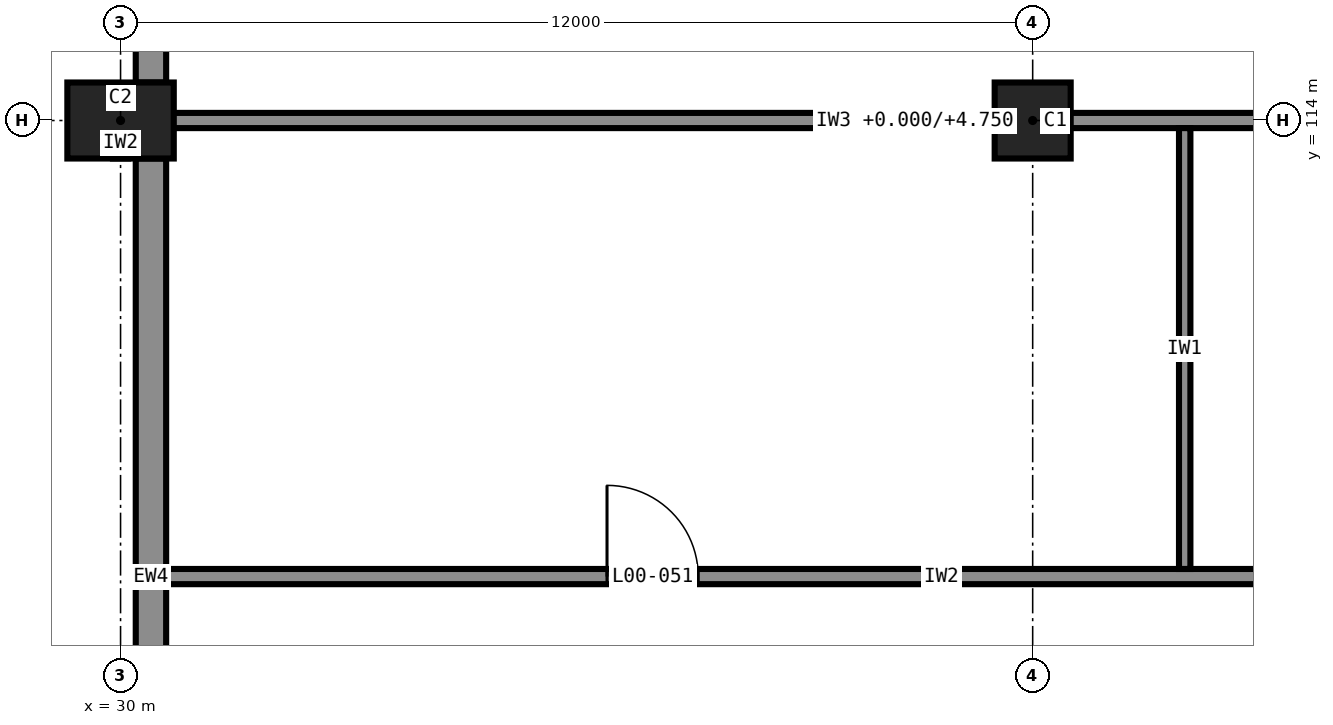
"""IFC4 building model, lengths in metres.
Left out: names, types, materials, properties, quantities, classifications, styles, units other than length and angle.
Written with IfcOpenShell. Run it as: python <this file> out.ifc"""

import sys

from ifc_helpers import new_model, si_unit, direction, frame, frame_2d, origin, origin_2d, place, context, subcontext, project, spatial, rectangle, extrude, element, fill, save


model = new_model("IFC4")
c1 = context("Model", 3, precision=1e-05, world=origin(), true_north=direction((0.0, 1.0)))
c2 = subcontext(c1, "Body", "Model", "MODEL_VIEW")
j1 = project(units=[si_unit("LENGTHUNIT", "METRE"), si_unit("PLANEANGLEUNIT", "RADIAN")], contexts=[c1])
p1 = place(None, origin())
s1 = spatial("IfcSite", under=j1, at=p1, CompositionType="ELEMENT")
p2 = place(p1, origin())
s2 = spatial("IfcBuilding", under=s1, at=p2, CompositionType="ELEMENT")
p3 = place(p2, origin())
s3 = spatial("IfcBuildingStorey", under=s2, at=p3, CompositionType="ELEMENT", Elevation=0.0)
p4 = place(p3, frame((30.0, 114.0, 0.0), z_axis=(0.0, 0.0, 1.0), x_axis=(1.0, 0.0, 0.0)))
e1 = element("IfcColumn", 1, at=p4, inside=s3, PredefinedType="COLUMN", context=c2, shape_type="SweptSolid", body=[
    extrude(rectangle(XDim=1.4, YDim=1.0, at=origin_2d()), origin(), (0.0, 0.0, 1.0), 6.0),
])
p5 = place(p3, frame((42.0, 114.0, 0.0), z_axis=(0.0, 0.0, 1.0), x_axis=(1.0, 0.0, 0.0)))
e2 = element("IfcColumn", 2, at=p5, inside=s3, PredefinedType="COLUMN", context=c2, shape_type="SweptSolid", body=[
    extrude(rectangle(XDim=1.0, YDim=1.0, at=origin_2d()), origin(), (0.0, 0.0, 1.0), 6.0),
])
p6 = place(p3, frame((30.4, 102.5, 0.0), z_axis=(0.0, 0.0, 1.0), x_axis=(0.0, 1.0, 0.0)))
e3 = element("IfcWall", 3, at=p6, inside=s3, PredefinedType="SOLIDWALL", context=c2, shape_type="SweptSolid", body=[
    extrude(rectangle(XDim=11.0, YDim=0.4, at=frame_2d((5.5, 0.0))), origin(), (0.0, 0.0, 1.0), 6.0),
])
p7 = place(p3, frame((30.4, 114.5, 0.0), z_axis=(0.0, 0.0, 1.0), x_axis=(0.0, 1.0, 0.0)))
e4 = element("IfcWall", 4, at=p7, inside=s3, PredefinedType="SOLIDWALL", context=c2, shape_type="SweptSolid", body=[
    extrude(rectangle(XDim=11.0, YDim=0.4, at=frame_2d((5.5, 0.0))), origin(), (0.0, 0.0, 1.0), 6.0),
])
p8 = place(p7, frame((4.3, 0.0, 0.0)))
e5 = element("IfcOpeningElement", 5, at=p8, cuts=e4, PredefinedType="OPENING", context=c2, shape_type="SweptSolid", body=[
    extrude(rectangle(XDim=2.4, YDim=2.4, at=frame_2d((1.2, 1.2))), frame((0.0, 0.21, 0.0), z_axis=(0.0, -1.0, 0.0), x_axis=(1.0, 0.0, 0.0)), (0.0, 0.0, 1.0), 0.42),
])
p9 = place(p3, frame((30.6, 108.0, 0.0), z_axis=(0.0, 0.0, 1.0), x_axis=(1.0, 0.0, 0.0)))
e6 = element("IfcWall", 6, at=p9, inside=s3, PredefinedType="PARTITIONING", context=c2, shape_type="SweptSolid", body=[
    extrude(rectangle(XDim=41.5, YDim=0.2, at=frame_2d((20.75, 0.0))), origin(), (0.0, 0.0, 1.0), 5.75),
])
p10 = place(p9, frame((5.8, 0.0, 0.0)))
e7 = element("IfcOpeningElement", 7, at=p10, cuts=e6, PredefinedType="OPENING", context=c2, shape_type="SweptSolid", body=[
    extrude(rectangle(XDim=1.2, YDim=2.1, at=frame_2d((0.6, 1.05))), frame((0.0, 0.11, 0.0), z_axis=(0.0, -1.0, 0.0), x_axis=(1.0, 0.0, 0.0)), (0.0, 0.0, 1.0), 0.22),
])
p11 = place(p9, frame((19.8, 0.0, 0.0)))
e8 = element("IfcOpeningElement", 8, at=p11, cuts=e6, PredefinedType="OPENING", context=c2, shape_type="SweptSolid", body=[
    extrude(rectangle(XDim=1.2, YDim=2.1, at=frame_2d((0.6, 1.05))), frame((0.0, 0.11, 0.0), z_axis=(0.0, -1.0, 0.0), x_axis=(1.0, 0.0, 0.0)), (0.0, 0.0, 1.0), 0.22),
])
p12 = place(p9, frame((33.8, 0.0, 0.0)))
e9 = element("IfcOpeningElement", 9, at=p12, cuts=e6, PredefinedType="OPENING", context=c2, shape_type="SweptSolid", body=[
    extrude(rectangle(XDim=1.2, YDim=2.1, at=frame_2d((0.6, 1.05))), frame((0.0, 0.11, 0.0), z_axis=(0.0, -1.0, 0.0), x_axis=(1.0, 0.0, 0.0)), (0.0, 0.0, 1.0), 0.22),
])
p13 = place(p3, frame((29.9, 114.0, 0.0), z_axis=(0.0, 0.0, 1.0), x_axis=(1.0, 0.0, 0.0)))
e10 = element("IfcWall", 10, at=p13, inside=s3, PredefinedType="PARTITIONING", context=c2, shape_type="SweptSolid", body=[
    extrude(rectangle(XDim=48.1, YDim=0.2, at=frame_2d((24.05, 0.0))), origin(), (0.0, 0.0, 1.0), 4.75),
])
p14 = place(p3, frame((30.0, 113.5, 0.0), z_axis=(0.0, 0.0, 1.0), x_axis=(0.0, 1.0, 0.0)))
e11 = element("IfcWall", 11, at=p14, inside=s3, PredefinedType="PARTITIONING", context=c2, shape_type="SweptSolid", body=[
    extrude(rectangle(XDim=0.4, YDim=0.2, at=frame_2d((0.2, 0.0))), origin(), (0.0, 0.0, 1.0), 5.75),
])
p15 = place(p3, frame((44.0, 108.1, 0.0), z_axis=(0.0, 0.0, 1.0), x_axis=(0.0, 1.0, 0.0)))
e12 = element("IfcWall", 12, at=p15, inside=s3, PredefinedType="PARTITIONING", context=c2, shape_type="SweptSolid", body=[
    extrude(rectangle(XDim=5.8, YDim=0.15, at=frame_2d((2.9, 0.0))), origin(), (0.0, 0.0, 1.0), 5.75),
])
p16 = place(p10, origin())
e13 = element("IfcDoor", 13, at=p16, inside=s3, OperationType="SINGLE_SWING_RIGHT", PredefinedType="DOOR", context=c2, shape_type="SweptSolid", body=[
    extrude(rectangle(XDim=1.2, YDim=2.1, at=frame_2d((0.6, 1.05))), frame((0.0, 0.025, 0.0), z_axis=(0.0, -1.0, 0.0), x_axis=(1.0, 0.0, 0.0)), (0.0, 0.0, 1.0), 0.05),
])
fill(e7, e13)
save(model, sys.argv[1])
